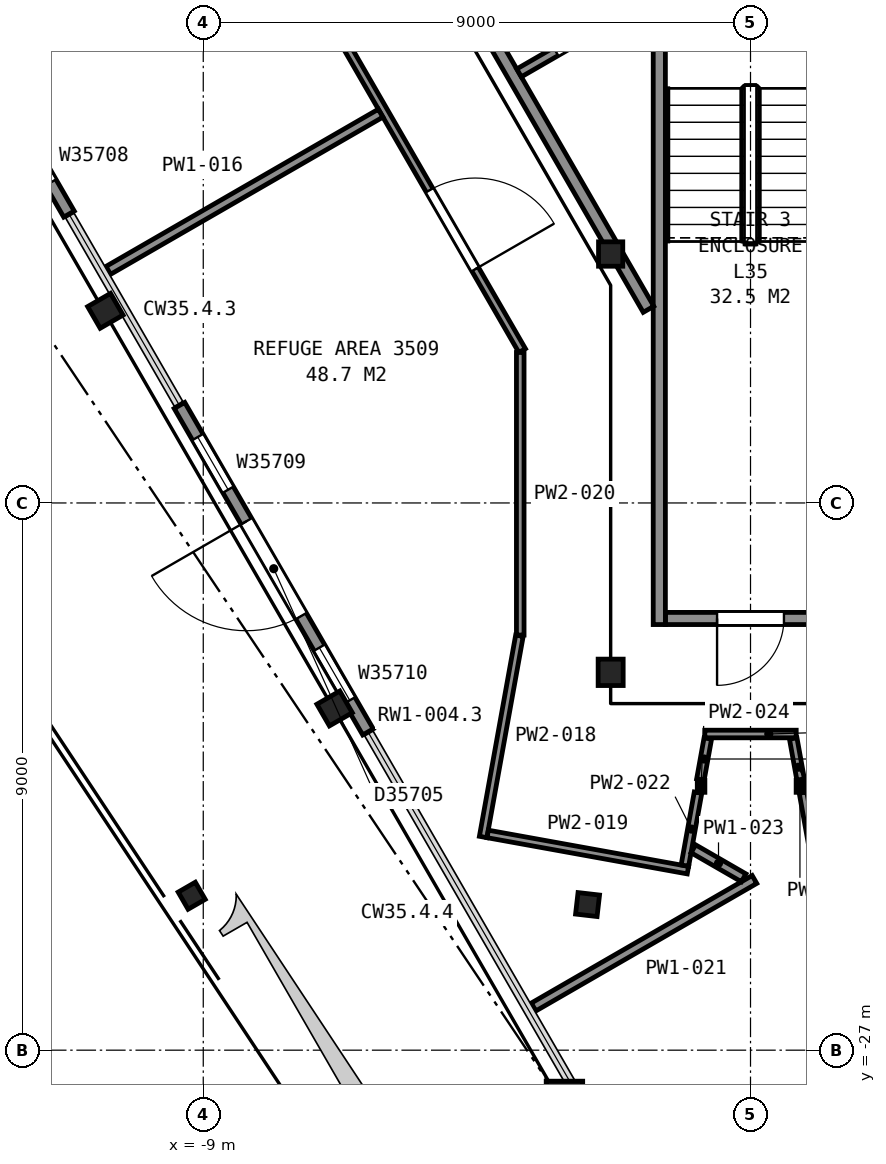
"""IFC4 building model, lengths in metres.
Left out: names, types, materials, properties, quantities, classifications, styles, units other than length and angle.
Written with IfcOpenShell. Run it as: python <this file> out.ifc"""

import sys

from ifc_helpers import new_model, si_unit, direction, frame, frame_2d, origin, origin_2d, place, context, subcontext, project, spatial, rectangle, hollow_rectangle, hollow_circle, i_section, extrude, element, fill, save


model = new_model("IFC4")
c1 = context("Model", 3, precision=1e-05, world=origin(), true_north=direction((0.0, 1.0)))
c2 = subcontext(c1, "Body", "Model", "MODEL_VIEW")
j1 = project(units=[si_unit("LENGTHUNIT", "METRE"), si_unit("PLANEANGLEUNIT", "RADIAN")], contexts=[c1])
p1 = place(None, origin())
s1 = spatial("IfcSite", under=j1, at=p1, CompositionType="ELEMENT")
p2 = place(p1, origin())
s2 = spatial("IfcBuilding", under=s1, at=p2, CompositionType="ELEMENT")
p3 = place(p2, frame((0.0, 0.0, 143.2)))
s3 = spatial("IfcBuildingStorey", under=s2, at=p3, CompositionType="ELEMENT", Elevation=143.2)
for number, where, z_axis, x_axis in (
    (1, (-10.61, -14.84, -0.16), (0.0, 0.0, 1.0), (-0.5, 0.866, 0.0)),
    (2, (-6.84, -21.38, -0.16), (0.0, 0.0, 1.0), (-0.5, 0.866, 0.0)),
):
    element("IfcColumn", number, at=place(p3, frame(where, z_axis=z_axis, x_axis=x_axis)), inside=s3, PredefinedType="COLUMN", context=c2, shape_type="SweptSolid", body=[
        extrude(i_section(OverallWidth=0.411, OverallDepth=0.434, WebThickness=0.036, FlangeThickness=0.057, FilletRadius=0.015, at=origin_2d()), origin(), (0.0, 0.0, 1.0), 5.76),
    ])
p4 = place(p3, frame((-3.06, -27.91, -0.16), z_axis=(0.0, 0.0, 1.0), x_axis=(-1.0, 0.0, 0.0)))
e3 = element("IfcColumn", 3, at=p4, inside=s3, PredefinedType="COLUMN", context=c2, shape_type="SweptSolid", body=[
    extrude(hollow_rectangle(XDim=0.6, YDim=0.8, WallThickness=0.05, at=origin_2d()), origin(), (0.0, 0.0, 1.0), 5.76),
])
p5 = place(p3, frame((-2.3, -14.399, 0.05), z_axis=(0.0, 0.393924222714, 0.919142919659), x_axis=(1.0, 0.0, 0.0)))
e4 = element("IfcColumn", 4, at=p5, inside=s3, PredefinedType="COLUMN", context=c2, shape_type="SweptSolid", body=[
    extrude(i_section(OverallWidth=0.401, OverallDepth=0.399, WebThickness=0.025, FlangeThickness=0.04, FilletRadius=0.015, at=origin_2d()), origin(), (0.0, 0.0, 1.0), 5.984),
])
p6 = place(p3, frame((-2.3, -21.276, 0.055), z_axis=(0.0, 0.3938946336, 0.919155600332), x_axis=(-1.0, 0.0, 0.0)))
e5 = element("IfcColumn", 5, at=p6, inside=s3, PredefinedType="COLUMN", context=c2, shape_type="SweptSolid", body=[
    extrude(i_section(OverallWidth=0.411, OverallDepth=0.434, WebThickness=0.036, FlangeThickness=0.057, FilletRadius=0.015, at=origin_2d()), origin(), (0.0, 0.0, 1.0), 5.973),
])
p7 = place(p3, frame((-9.19, -24.46, -0.73), z_axis=(0.0, 0.0, 1.0), x_axis=(-0.5, 0.866025403784, 0.0)))
e6 = element("IfcColumn", 6, at=p7, inside=s3, PredefinedType="COLUMN", context=c2, shape_type="SweptSolid", body=[
    extrude(hollow_circle(Radius=0.163, WallThickness=0.013, at=origin_2d()), origin(), (0.0, 0.0, 1.0), 5.17),
])
p8 = place(p3, frame((-2.68, -24.605, -0.16), z_axis=(0.0, 0.0, 1.0), x_axis=(0.99345495792, -0.114224544576, 0.0)))
e7 = element("IfcColumn", 7, at=p8, inside=s3, PredefinedType="COLUMN", context=c2, shape_type="SweptSolid", body=[
    extrude(hollow_rectangle(XDim=0.356, YDim=0.356, WallThickness=0.013, InnerFilletRadius=0.006, OuterFilletRadius=0.019, at=origin_2d()), origin(), (0.0, 0.0, 1.0), 5.6),
])
p9 = place(p3, frame((-14.308, -7.879, 0.0), z_axis=(0.0, 0.0, 1.0), x_axis=(0.49998037582, -0.866036733513, 0.0)))
e8 = element("IfcWall", 8, at=p9, inside=s3, PredefinedType="SOLIDWALL", context=c2, shape_type="SweptSolid", body=[
    extrude(rectangle(XDim=6.2, YDim=0.2, at=frame_2d((3.1, 0.0))), origin(), (0.0, 0.0, 1.0), 4.323),
])
p10 = place(p9, frame((0.6, 0.0, 0.9)))
e9 = element("IfcOpeningElement", 9, at=p10, cuts=e8, PredefinedType="OPENING", context=c2, shape_type="SweptSolid", body=[
    extrude(rectangle(XDim=1.0, YDim=1.5, at=frame_2d((0.5, 0.75))), frame((0.0, 0.11, 0.0), z_axis=(0.0, -1.0, 0.0), x_axis=(1.0, 0.0, 0.0)), (0.0, 0.0, 1.0), 0.22),
])
p11 = place(p9, frame((2.2, 0.0, 0.0)))
e10 = element("IfcOpeningElement", 10, at=p11, cuts=e8, PredefinedType="OPENING", context=c2, shape_type="SweptSolid", body=[
    extrude(rectangle(XDim=1.8, YDim=2.4, at=frame_2d((0.9, 1.2))), frame((0.0, 0.11, 0.0), z_axis=(0.0, -1.0, 0.0), x_axis=(1.0, 0.0, 0.0)), (0.0, 0.0, 1.0), 0.22),
])
p12 = place(p9, frame((4.6, 0.0, 0.9)))
e11 = element("IfcOpeningElement", 11, at=p12, cuts=e8, PredefinedType="OPENING", context=c2, shape_type="SweptSolid", body=[
    extrude(rectangle(XDim=1.0, YDim=1.5, at=frame_2d((0.5, 0.75))), frame((0.0, 0.11, 0.0), z_axis=(0.0, -1.0, 0.0), x_axis=(1.0, 0.0, 0.0)), (0.0, 0.0, 1.0), 0.22),
])
p13 = place(p3, frame((-9.391, -16.396, 0.0), z_axis=(0.0, 0.0, 1.0), x_axis=(0.500026960575, -0.86600983753, 0.0)))
e12 = element("IfcWall", 12, at=p13, inside=s3, PredefinedType="SOLIDWALL", context=c2, shape_type="SweptSolid", body=[
    extrude(rectangle(XDim=6.2, YDim=0.2, at=frame_2d((3.1, 0.0))), origin(), (0.0, 0.0, 1.0), 4.323),
])
p14 = place(p13, frame((0.6, 0.0, 0.9)))
e13 = element("IfcOpeningElement", 13, at=p14, cuts=e12, PredefinedType="OPENING", context=c2, shape_type="SweptSolid", body=[
    extrude(rectangle(XDim=1.0, YDim=1.5, at=frame_2d((0.5, 0.75))), frame((0.0, 0.11, 0.0), z_axis=(0.0, -1.0, 0.0), x_axis=(1.0, 0.0, 0.0)), (0.0, 0.0, 1.0), 0.22),
])
p15 = place(p13, frame((2.2, 0.0, 0.0)))
e14 = element("IfcOpeningElement", 14, at=p15, cuts=e12, PredefinedType="OPENING", context=c2, shape_type="SweptSolid", body=[
    extrude(rectangle(XDim=1.8, YDim=2.4, at=frame_2d((0.9, 1.2))), frame((0.0, 0.11, 0.0), z_axis=(0.0, -1.0, 0.0), x_axis=(1.0, 0.0, 0.0)), (0.0, 0.0, 1.0), 0.22),
])
p16 = place(p13, frame((4.6, 0.0, 0.9)))
e15 = element("IfcOpeningElement", 15, at=p16, cuts=e12, PredefinedType="OPENING", context=c2, shape_type="SweptSolid", body=[
    extrude(rectangle(XDim=1.0, YDim=1.5, at=frame_2d((0.5, 0.75))), frame((0.0, 0.11, 0.0), z_axis=(0.0, -1.0, 0.0), x_axis=(1.0, 0.0, 0.0)), (0.0, 0.0, 1.0), 0.22),
])
p17 = place(p3, frame((-1.4, -19.9, 0.0), z_axis=(0.0, 0.0, 1.0), x_axis=(1.0, 0.0, 0.0)))
e16 = element("IfcWall", 16, at=p17, inside=s3, PredefinedType="PARTITIONING", context=c2, shape_type="SweptSolid", body=[
    extrude(rectangle(XDim=2.8, YDim=0.2, at=frame_2d((1.4, 0.0))), origin(), (0.0, 0.0, 1.0), 5.35),
])
p18 = place(p17, frame((0.85, 0.0, 0.0)))
e17 = element("IfcOpeningElement", 17, at=p18, cuts=e16, PredefinedType="OPENING", context=c2, shape_type="SweptSolid", body=[
    extrude(rectangle(XDim=1.1, YDim=2.1, at=frame_2d((0.55, 1.05))), frame((0.0, 0.11, 0.0), z_axis=(0.0, -1.0, 0.0), x_axis=(1.0, 0.0, 0.0)), (0.0, 0.0, 1.0), 0.22),
])
p19 = place(p3, frame((-1.5, -8.0, 0.0), z_axis=(0.0, 0.0, 1.0), x_axis=(0.0, -1.0, 0.0)))
e18 = element("IfcWall", 18, at=p19, inside=s3, PredefinedType="PARTITIONING", context=c2, shape_type="SweptSolid", body=[
    extrude(rectangle(XDim=12.0, YDim=0.2, at=frame_2d((6.0, 0.0))), origin(), (0.0, 0.0, 1.0), 5.35),
])
p20 = place(p3, frame((-6.093, -7.167, 0.0), z_axis=(0.0, 0.0, 1.0), x_axis=(0.500010425738, -0.866019384398, 0.0)))
e19 = element("IfcWall", 19, at=p20, inside=s3, PredefinedType="PARTITIONING", context=c2, shape_type="SweptSolid", body=[
    extrude(rectangle(XDim=8.831, YDim=0.2, at=frame_2d((4.416, 0.0))), origin(), (0.0, 0.0, 1.0), 4.697),
])
p21 = place(p3, frame((-3.806, -10.927, 0.0), z_axis=(0.0, 0.0, 1.0), x_axis=(0.865998469481, 0.500046648681, 0.0)))
e20 = element("IfcWall", 20, at=p21, inside=s3, PredefinedType="PARTITIONING", context=c2, shape_type="SweptSolid", body=[
    extrude(rectangle(XDim=2.325, YDim=0.15, at=frame_2d((1.163, 0.0))), origin(), (0.0, 0.0, 1.0), 4.697),
])
p22 = place(p21, frame((0.7, 0.0, 0.0)))
e21 = element("IfcOpeningElement", 21, at=p22, cuts=e20, PredefinedType="OPENING", context=c2, shape_type="SweptSolid", body=[
    extrude(rectangle(XDim=0.9, YDim=2.1, at=frame_2d((0.45, 1.05))), frame((0.0, 0.085, 0.0), z_axis=(0.0, -1.0, 0.0), x_axis=(1.0, 0.0, 0.0)), (0.0, 0.0, 1.0), 0.17),
])
p23 = place(p3, frame((-3.756, -15.494, 0.0), z_axis=(0.0, 0.0, 1.0), x_axis=(-0.500027787016, 0.866009360349, 0.0)))
e22 = element("IfcWall", 22, at=p23, inside=s3, PredefinedType="PARTITIONING", context=c2, shape_type="SweptSolid", body=[
    extrude(rectangle(XDim=23.856, YDim=0.125, at=frame_2d((11.928, 0.0))), origin(), (0.0, 0.0, 1.0), 4.262),
])
p24 = place(p23, frame((20.393, 0.0, 0.0)))
e23 = element("IfcOpeningElement", 23, at=p24, cuts=e22, PredefinedType="OPENING", context=c2, shape_type="SweptSolid", body=[
    extrude(rectangle(XDim=1.5, YDim=2.1, at=frame_2d((0.75, 1.05))), frame((0.0, 0.073, 0.0), z_axis=(0.0, -1.0, 0.0), x_axis=(1.0, 0.0, 0.0)), (0.0, 0.0, 1.0), 0.145),
])
p25 = place(p23, frame((10.785, 0.0, 0.0)))
e24 = element("IfcOpeningElement", 24, at=p25, cuts=e22, PredefinedType="OPENING", context=c2, shape_type="SweptSolid", body=[
    extrude(rectangle(XDim=1.5, YDim=2.1, at=frame_2d((0.75, 1.05))), frame((0.0, 0.073, 0.0), z_axis=(0.0, -1.0, 0.0), x_axis=(1.0, 0.0, 0.0)), (0.0, 0.0, 1.0), 0.145),
])
p26 = place(p23, frame((1.545, 0.0, 0.0)))
e25 = element("IfcOpeningElement", 25, at=p26, cuts=e22, PredefinedType="OPENING", context=c2, shape_type="SweptSolid", body=[
    extrude(rectangle(XDim=1.5, YDim=2.1, at=frame_2d((0.75, 1.05))), frame((0.0, 0.073, 0.0), z_axis=(0.0, -1.0, 0.0), x_axis=(1.0, 0.0, 0.0)), (0.0, 0.0, 1.0), 0.145),
])
p27 = place(p3, frame((-10.562, -14.175, 0.0), z_axis=(0.0, 0.0, 1.0), x_axis=(0.866079472015, 0.499906339382, 0.0)))
e26 = element("IfcWall", 26, at=p27, inside=s3, PredefinedType="PARTITIONING", context=c2, shape_type="SweptSolid", body=[
    extrude(rectangle(XDim=5.172, YDim=0.15, at=frame_2d((2.586, 0.0))), origin(), (0.0, 0.0, 1.0), 4.262),
])
p28 = place(p3, frame((-4.397, -23.493, 0.0), z_axis=(0.0, 0.0, 1.0), x_axis=(0.177428643019, 0.984133668074, 0.0)))
e27 = element("IfcWall", 27, at=p28, inside=s3, PredefinedType="PARTITIONING", context=c2, shape_type="SweptSolid", body=[
    extrude(rectangle(XDim=3.363, YDim=0.125, at=frame_2d((1.682, 0.0))), origin(), (0.0, 0.0, 1.0), 4.262),
])
p29 = place(p3, frame((-4.322, -23.444, 0.0), z_axis=(0.0, 0.0, 1.0), x_axis=(0.984036430709, -0.177967140331, 0.0)))
e28 = element("IfcWall", 28, at=p29, inside=s3, PredefinedType="PARTITIONING", context=c2, shape_type="SweptSolid", body=[
    extrude(rectangle(XDim=3.346, YDim=0.125, at=frame_2d((1.673, 0.0))), origin(), (0.0, 0.0, 1.0), 4.262),
])
p30 = place(p3, frame((-3.787, -20.173, 0.0), z_axis=(0.0, 0.0, 1.0), x_axis=(0.0, 1.0, 0.0)))
e29 = element("IfcWall", 29, at=p30, inside=s3, PredefinedType="PARTITIONING", context=c2, shape_type="SweptSolid", body=[
    extrude(rectangle(XDim=4.648, YDim=0.125, at=frame_2d((2.324, 0.0))), origin(), (0.0, 0.0, 1.0), 4.262),
])
p31 = place(p3, frame((-3.568, -26.29, 0.0), z_axis=(0.0, 0.0, 1.0), x_axis=(0.865999496279, 0.500044870432, 0.0)))
e30 = element("IfcWall", 30, at=p31, inside=s3, PredefinedType="PARTITIONING", context=c2, shape_type="SweptSolid", body=[
    extrude(rectangle(XDim=4.195, YDim=0.15, at=frame_2d((2.097, 0.0))), origin(), (0.0, 0.0, 1.0), 4.262),
])
p32 = place(p3, frame((-1.079, -23.964, 0.0), z_axis=(0.0, 0.0, 1.0), x_axis=(0.177370172534, 0.984144207876, 0.0)))
e31 = element("IfcWall", 31, at=p32, inside=s3, PredefinedType="PARTITIONING", context=c2, shape_type="SweptSolid", body=[
    extrude(rectangle(XDim=1.219, YDim=0.125, at=frame_2d((0.61, 0.0))), origin(), (0.0, 0.0, 1.0), 4.262),
])
p33 = place(p3, frame((-0.94, -23.688, 0.0), z_axis=(0.0, 0.0, 1.0), x_axis=(0.866270657977, -0.499574966474, 0.0)))
e32 = element("IfcWall", 32, at=p33, inside=s3, PredefinedType="PARTITIONING", context=c2, shape_type="SweptSolid", body=[
    extrude(rectangle(XDim=0.955, YDim=0.15, at=frame_2d((0.478, 0.0))), origin(), (0.0, 0.0, 1.0), 4.262),
])
p34 = place(p3, frame((-0.813, -22.759, 0.0), z_axis=(0.0, 0.0, 1.0), x_axis=(0.0, 1.0, 0.0)))
e33 = element("IfcWall", 33, at=p34, inside=s3, PredefinedType="PARTITIONING", context=c2, shape_type="SweptSolid", body=[
    extrude(rectangle(XDim=0.197, YDim=0.125, at=frame_2d((0.099, 0.0))), origin(), (0.0, 0.0, 1.0), 4.262),
])
p35 = place(p3, frame((-0.824, -22.549, 0.0), z_axis=(0.0, 0.0, 1.0), x_axis=(0.177663374982, 0.984091319538, 0.0)))
e34 = element("IfcWall", 34, at=p35, inside=s3, PredefinedType="PARTITIONING", context=c2, shape_type="SweptSolid", body=[
    extrude(rectangle(XDim=0.686, YDim=0.125, at=frame_2d((0.343, 0.0))), origin(), (0.0, 0.0, 1.0), 4.262),
])
p36 = place(p3, frame((-0.751, -21.8, 0.0), z_axis=(0.0, 0.0, 1.0), x_axis=(1.0, 0.0, 0.0)))
e35 = element("IfcWall", 35, at=p36, inside=s3, PredefinedType="PARTITIONING", context=c2, shape_type="SweptSolid", body=[
    extrude(rectangle(XDim=1.503, YDim=0.125, at=frame_2d((0.751, 0.0))), origin(), (0.0, 0.0, 1.0), 4.262),
])
p37 = place(p3, frame((0.702, -21.874, 0.0), z_axis=(0.0, 0.0, 1.0), x_axis=(0.177663374982, -0.984091319538, 0.0)))
e36 = element("IfcWall", 36, at=p37, inside=s3, PredefinedType="PARTITIONING", context=c2, shape_type="SweptSolid", body=[
    extrude(rectangle(XDim=0.686, YDim=0.125, at=frame_2d((0.343, 0.0))), origin(), (0.0, 0.0, 1.0), 4.262),
])
p38 = place(p3, frame((0.813, -22.759, 0.0), z_axis=(0.0, 0.0, 1.0), x_axis=(0.0, 1.0, 0.0)))
e37 = element("IfcWall", 37, at=p38, inside=s3, PredefinedType="PARTITIONING", context=c2, shape_type="SweptSolid", body=[
    extrude(rectangle(XDim=0.197, YDim=0.125, at=frame_2d((0.099, 0.0))), origin(), (0.0, 0.0, 1.0), 4.262),
])
p39 = place(p3, frame((0.863, -22.764, 0.0), z_axis=(0.0, 0.0, 1.0), x_axis=(0.177370172534, -0.984144207876, 0.0)))
e38 = element("IfcWall", 38, at=p39, inside=s3, PredefinedType="PARTITIONING", context=c2, shape_type="SweptSolid", body=[
    extrude(rectangle(XDim=1.219, YDim=0.125, at=frame_2d((0.61, 0.0))), origin(), (0.0, 0.0, 1.0), 4.262),
])
p40 = place(p14, origin())
e39 = element("IfcWindow", 39, at=p40, inside=s3, PartitioningType="SINGLE_PANEL", PredefinedType="WINDOW", context=c2, shape_type="SweptSolid", body=[
    extrude(rectangle(XDim=1.0, YDim=1.5, at=frame_2d((0.5, 0.75))), frame((0.0, 0.03, 0.0), z_axis=(0.0, -1.0, 0.0), x_axis=(1.0, 0.0, 0.0)), (0.0, 0.0, 1.0), 0.06),
])
fill(e13, e39)
p41 = place(p15, frame((1.8, 0.0, 0.0), z_axis=(0.0, 0.0, 1.0), x_axis=(-1.0, 0.0, 0.0)))
e40 = element("IfcDoor", 40, at=p41, inside=s3, OperationType="DOUBLE_DOOR_SINGLE_SWING", PredefinedType="DOOR", context=c2, shape_type="SweptSolid", body=[
    extrude(rectangle(XDim=1.8, YDim=2.4, at=frame_2d((0.9, 1.2))), frame((0.0, 0.025, 0.0), z_axis=(0.0, -1.0, 0.0), x_axis=(1.0, 0.0, 0.0)), (0.0, 0.0, 1.0), 0.05),
])
fill(e14, e40)
p42 = place(p16, origin())
e41 = element("IfcWindow", 41, at=p42, inside=s3, PartitioningType="SINGLE_PANEL", PredefinedType="WINDOW", context=c2, shape_type="SweptSolid", body=[
    extrude(rectangle(XDim=1.0, YDim=1.5, at=frame_2d((0.5, 0.75))), frame((0.0, 0.03, 0.0), z_axis=(0.0, -1.0, 0.0), x_axis=(1.0, 0.0, 0.0)), (0.0, 0.0, 1.0), 0.06),
])
fill(e15, e41)
p43 = place(p18, origin())
e42 = element("IfcDoor", 42, at=p43, inside=s3, OperationType="SINGLE_SWING_LEFT", PredefinedType="DOOR", context=c2, shape_type="SweptSolid", body=[
    extrude(rectangle(XDim=1.1, YDim=2.1, at=frame_2d((0.55, 1.05))), frame((0.0, 0.025, 0.0), z_axis=(0.0, -1.0, 0.0), x_axis=(1.0, 0.0, 0.0)), (0.0, 0.0, 1.0), 0.05),
])
fill(e17, e42)
p44 = place(p22, origin())
e43 = element("IfcDoor", 43, at=p44, inside=s3, OperationType="SINGLE_SWING_RIGHT", PredefinedType="DOOR", context=c2, shape_type="SweptSolid", body=[
    extrude(rectangle(XDim=0.9, YDim=2.1, at=frame_2d((0.45, 1.05))), frame((0.0, 0.025, 0.0), z_axis=(0.0, -1.0, 0.0), x_axis=(1.0, 0.0, 0.0)), (0.0, 0.0, 1.0), 0.05),
])
fill(e21, e43)
p45 = place(p26, origin())
e44 = element("IfcDoor", 44, at=p45, inside=s3, OperationType="DOUBLE_DOOR_SINGLE_SWING", PredefinedType="DOOR", context=c2, shape_type="SweptSolid", body=[
    extrude(rectangle(XDim=1.5, YDim=2.1, at=frame_2d((0.75, 1.05))), frame((0.0, 0.025, 0.0), z_axis=(0.0, -1.0, 0.0), x_axis=(1.0, 0.0, 0.0)), (0.0, 0.0, 1.0), 0.05),
])
fill(e25, e44)
save(model, sys.argv[1])
